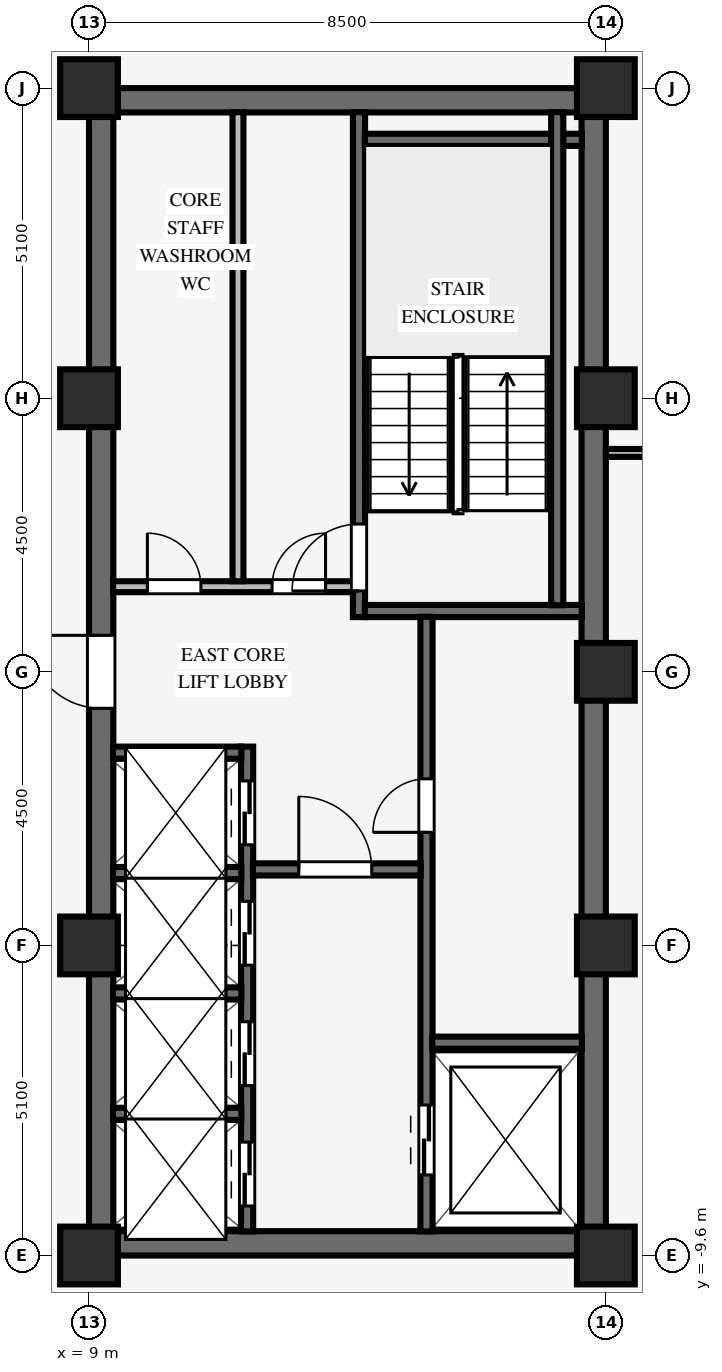
"""IFC4 building model, lengths in metres.
Left out: names, types, materials, properties, quantities, classifications, styles, units other than length and angle.
Written with IfcOpenShell. Run it as: python <this file> out.ifc"""

import sys

from ifc_helpers import new_model, si_unit, direction, frame, frame_2d, origin, origin_2d, place, context, subcontext, project, spatial, rectangle, extrude, source, transform, mapped, element, fill, save


model = new_model("IFC4")
c1 = context("Model", 3, precision=1e-05, world=origin(), true_north=direction((0.0, 1.0)))
c2 = subcontext(c1, "Body", "Model", "MODEL_VIEW")
j1 = project(units=[si_unit("LENGTHUNIT", "METRE"), si_unit("PLANEANGLEUNIT", "RADIAN")], contexts=[c1])
p1 = place(None, origin())
s1 = spatial("IfcSite", under=j1, at=p1, CompositionType="ELEMENT")
p2 = place(p1, origin())
s2 = spatial("IfcBuilding", under=s1, at=p2, CompositionType="ELEMENT")
p3 = place(p2, frame((0.0, 0.0, 138.45)))
s3 = spatial("IfcBuildingStorey", under=s2, at=p3, CompositionType="ELEMENT", Elevation=138.45)
for number, where, z_axis, x_axis in (
    (1, (9.0, -9.4, 0.0), (0.0, 0.0, 1.0), (1.0, 0.0, 0.0)),
    (2, (9.0, 9.4, 0.0), (0.0, 0.0, 1.0), (1.0, 0.0, 0.0)),
):
    element("IfcWall", number, at=place(p3, frame(where, z_axis=z_axis, x_axis=x_axis)), inside=s3, PredefinedType="SHEAR", context=c2, shape_type="SweptSolid", body=[
        extrude(rectangle(XDim=8.5, YDim=0.4, at=frame_2d((4.25, 0.0))), origin(), (0.0, 0.0, 1.0), 3.37),
    ])
p4 = place(p3, frame((9.2, -9.205, 0.0), z_axis=(0.0, 0.0, 1.0), x_axis=(0.0, 1.0, 0.0)))
e3 = element("IfcWall", 3, at=p4, inside=s3, PredefinedType="SHEAR", context=c2, shape_type="SweptSolid", body=[
    extrude(rectangle(XDim=18.41, YDim=0.4, at=frame_2d((9.205, 0.0))), origin(), (0.0, 0.0, 1.0), 3.37),
])
p5 = place(p4, frame((8.605, 0.0, 0.0)))
e4 = element("IfcOpeningElement", 4, at=p5, cuts=e3, PredefinedType="OPENING", context=c2, shape_type="SweptSolid", body=[
    extrude(rectangle(XDim=1.2, YDim=2.15, at=frame_2d((0.6, 1.075))), frame((0.0, 0.21, 0.0), z_axis=(0.0, -1.0, 0.0), x_axis=(1.0, 0.0, 0.0)), (0.0, 0.0, 1.0), 0.42),
])
p6 = place(p3, frame((17.3, -9.205, 0.0), z_axis=(0.0, 0.0, 1.0), x_axis=(0.0, 1.0, 0.0)))
e5 = element("IfcWall", 5, at=p6, inside=s3, PredefinedType="SHEAR", context=c2, shape_type="SweptSolid", body=[
    extrude(rectangle(XDim=18.41, YDim=0.4, at=frame_2d((9.205, 0.0))), origin(), (0.0, 0.0, 1.0), 3.37),
])
for number, where, z_axis, x_axis in (
    (6, (9.0, -9.6, 0.0), (0.0, 0.0, 1.0), (1.0, 0.0, 0.0)),
    (7, (9.0, -4.5, 0.0), (0.0, 0.0, 1.0), (1.0, 0.0, 0.0)),
    (8, (9.0, 4.5, 0.0), (0.0, 0.0, 1.0), (1.0, 0.0, 0.0)),
    (9, (9.0, 9.6, 0.0), (0.0, 0.0, 1.0), (1.0, 0.0, 0.0)),
    (10, (17.5, -9.6, 0.0), (0.0, 0.0, 1.0), (1.0, 0.0, 0.0)),
    (11, (17.5, -4.5, 0.0), (0.0, 0.0, 1.0), (1.0, 0.0, 0.0)),
    (12, (17.5, 4.5, 0.0), (0.0, 0.0, 1.0), (1.0, 0.0, 0.0)),
    (13, (17.5, 9.6, 0.0), (0.0, 0.0, 1.0), (1.0, 0.0, 0.0)),
    (14, (17.5, 0.0, 0.0), (0.0, 0.0, 1.0), (1.0, 0.0, 0.0)),
):
    element("IfcColumn", number, at=place(p3, frame(where, z_axis=z_axis, x_axis=x_axis)), inside=s3, PredefinedType="COLUMN", context=c2, shape_type="SweptSolid", body=[
        extrude(rectangle(XDim=0.95, YDim=0.95, at=origin_2d()), origin(), (0.0, 0.0, 1.0), 3.37),
    ])
p7 = place(p3, frame((13.44, 0.9, 0.0), z_axis=(0.0, 0.0, 1.0), x_axis=(0.0, 1.0, 0.0)))
e15 = element("IfcWall", 15, at=p7, inside=s3, PredefinedType="SHEAR", context=c2, shape_type="SweptSolid", body=[
    extrude(rectangle(XDim=8.305, YDim=0.2, at=frame_2d((4.153, 0.0))), origin(), (0.0, 0.0, 1.0), 3.37),
])
p8 = place(p7, frame((0.43, 0.0, 0.0)))
e16 = element("IfcOpeningElement", 16, at=p8, cuts=e15, PredefinedType="OPENING", context=c2, shape_type="SweptSolid", body=[
    extrude(rectangle(XDim=1.1, YDim=2.15, at=frame_2d((0.55, 1.075))), frame((0.0, 0.11, 0.0), z_axis=(0.0, -1.0, 0.0), x_axis=(1.0, 0.0, 0.0)), (0.0, 0.0, 1.0), 0.22),
])
for number, where, z_axis, x_axis in (
    (17, (13.535, 1.0, 0.0), (0.0, 0.0, 1.0), (1.0, 0.0, 0.0)),
    (18, (13.535, 8.75, 0.0), (0.0, 0.0, 1.0), (1.0, 0.0, 0.0)),
):
    element("IfcWall", number, at=place(p3, frame(where, z_axis=z_axis, x_axis=x_axis)), inside=s3, PredefinedType="SHEAR", context=c2, shape_type="SweptSolid", body=[
        extrude(rectangle(XDim=3.57, YDim=0.2, at=frame_2d((1.785, 0.0))), origin(), (0.0, 0.0, 1.0), 3.37),
    ])
p9 = place(p3, frame((16.7, 1.095, 0.0), z_axis=(0.0, 0.0, 1.0), x_axis=(0.0, 1.0, 0.0)))
e19 = element("IfcWall", 19, at=p9, inside=s3, PredefinedType="SHEAR", context=c2, shape_type="SweptSolid", body=[
    extrude(rectangle(XDim=8.11, YDim=0.2, at=frame_2d((4.055, 0.0))), origin(), (0.0, 0.0, 1.0), 3.37),
])
p10 = place(p3, frame((14.55, -9.205, 0.0), z_axis=(0.0, 0.0, 1.0), x_axis=(0.0, 1.0, 0.0)))
e20 = element("IfcWall", 20, at=p10, inside=s3, PredefinedType="SHEAR", context=c2, shape_type="SweptSolid", body=[
    extrude(rectangle(XDim=10.11, YDim=0.2, at=frame_2d((5.055, 0.0))), origin(), (0.0, 0.0, 1.0), 3.37),
])
p11 = place(p10, frame((6.565, 0.0, 0.0)))
e21 = element("IfcOpeningElement", 21, at=p11, cuts=e20, PredefinedType="OPENING", context=c2, shape_type="SweptSolid", body=[
    extrude(rectangle(XDim=0.88, YDim=2.1, at=frame_2d((0.44, 1.05))), frame((0.0, 0.11, 0.0), z_axis=(0.0, -1.0, 0.0), x_axis=(1.0, 0.0, 0.0)), (0.0, 0.0, 1.0), 0.22),
])
p12 = place(p10, frame((0.93, 0.0, 0.0)))
e22 = element("IfcOpeningElement", 22, at=p12, cuts=e20, PredefinedType="OPENING", context=c2, shape_type="SweptSolid", body=[
    extrude(rectangle(XDim=1.15, YDim=2.15, at=frame_2d((0.575, 1.075))), frame((0.0, 0.11, 0.0), z_axis=(0.0, -1.0, 0.0), x_axis=(1.0, 0.0, 0.0)), (0.0, 0.0, 1.0), 0.22),
])
p13 = place(p3, frame((14.645, -6.1, 0.0), z_axis=(0.0, 0.0, 1.0), x_axis=(1.0, 0.0, 0.0)))
e23 = element("IfcWall", 23, at=p13, inside=s3, PredefinedType="SHEAR", context=c2, shape_type="SweptSolid", body=[
    extrude(rectangle(XDim=2.46, YDim=0.2, at=frame_2d((1.23, 0.0))), origin(), (0.0, 0.0, 1.0), 3.37),
])
p14 = place(p3, frame((11.6, -9.205, 0.0), z_axis=(0.0, 0.0, 1.0), x_axis=(0.0, 1.0, 0.0)))
e24 = element("IfcWall", 24, at=p14, inside=s3, PredefinedType="SHEAR", context=c2, shape_type="SweptSolid", body=[
    extrude(rectangle(XDim=7.975, YDim=0.2, at=frame_2d((3.988, 0.0))), origin(), (0.0, 0.0, 1.0), 3.37),
])
p15 = place(p14, frame((0.42, 0.0, 0.0)))
e25 = element("IfcOpeningElement", 25, at=p15, cuts=e24, PredefinedType="OPENING", context=c2, shape_type="SweptSolid", body=[
    extrude(rectangle(XDim=1.05, YDim=2.15, at=frame_2d((0.525, 1.075))), frame((0.0, 0.11, 0.0), z_axis=(0.0, -1.0, 0.0), x_axis=(1.0, 0.0, 0.0)), (0.0, 0.0, 1.0), 0.22),
])
p16 = place(p14, frame((2.4, 0.0, 0.0)))
e26 = element("IfcOpeningElement", 26, at=p16, cuts=e24, PredefinedType="OPENING", context=c2, shape_type="SweptSolid", body=[
    extrude(rectangle(XDim=1.05, YDim=2.15, at=frame_2d((0.525, 1.075))), frame((0.0, 0.11, 0.0), z_axis=(0.0, -1.0, 0.0), x_axis=(1.0, 0.0, 0.0)), (0.0, 0.0, 1.0), 0.22),
])
p17 = place(p14, frame((4.38, 0.0, 0.0)))
e27 = element("IfcOpeningElement", 27, at=p17, cuts=e24, PredefinedType="OPENING", context=c2, shape_type="SweptSolid", body=[
    extrude(rectangle(XDim=1.05, YDim=2.15, at=frame_2d((0.525, 1.075))), frame((0.0, 0.11, 0.0), z_axis=(0.0, -1.0, 0.0), x_axis=(1.0, 0.0, 0.0)), (0.0, 0.0, 1.0), 0.22),
])
p18 = place(p14, frame((6.36, 0.0, 0.0)))
e28 = element("IfcOpeningElement", 28, at=p18, cuts=e24, PredefinedType="OPENING", context=c2, shape_type="SweptSolid", body=[
    extrude(rectangle(XDim=1.05, YDim=2.15, at=frame_2d((0.525, 1.075))), frame((0.0, 0.11, 0.0), z_axis=(0.0, -1.0, 0.0), x_axis=(1.0, 0.0, 0.0)), (0.0, 0.0, 1.0), 0.22),
])
p19 = place(p3, frame((11.695, -3.25, 0.0), z_axis=(0.0, 0.0, 1.0), x_axis=(1.0, 0.0, 0.0)))
e29 = element("IfcWall", 29, at=p19, inside=s3, PredefinedType="SHEAR", context=c2, shape_type="SweptSolid", body=[
    extrude(rectangle(XDim=2.76, YDim=0.2, at=frame_2d((1.38, 0.0))), origin(), (0.0, 0.0, 1.0), 3.37),
])
p20 = place(p19, frame((0.755, 0.0, 0.0)))
e30 = element("IfcOpeningElement", 30, at=p20, cuts=e29, PredefinedType="OPENING", context=c2, shape_type="SweptSolid", body=[
    extrude(rectangle(XDim=1.2, YDim=2.15, at=frame_2d((0.6, 1.075))), frame((0.0, 0.11, 0.0), z_axis=(0.0, -1.0, 0.0), x_axis=(1.0, 0.0, 0.0)), (0.0, 0.0, 1.0), 0.22),
])
for number, where, z_axis, x_axis in (
    (31, (9.395, -7.27, 0.0), (0.0, 0.0, 1.0), (1.0, 0.0, 0.0)),
    (32, (9.395, -5.29, 0.0), (0.0, 0.0, 1.0), (1.0, 0.0, 0.0)),
    (33, (9.395, -3.31, 0.0), (0.0, 0.0, 1.0), (1.0, 0.0, 0.0)),
    (34, (9.395, -1.33, 0.0), (0.0, 0.0, 1.0), (1.0, 0.0, 0.0)),
):
    element("IfcWall", number, at=place(p3, frame(where, z_axis=z_axis, x_axis=x_axis)), inside=s3, PredefinedType="SHEAR", context=c2, shape_type="SweptSolid", body=[
        extrude(rectangle(XDim=2.11, YDim=0.2, at=frame_2d((1.055, 0.0))), origin(), (0.0, 0.0, 1.0), 3.37),
    ])
p21 = place(p3, frame((9.395, 1.4, 0.0), z_axis=(0.0, 0.0, 1.0), x_axis=(1.0, 0.0, 0.0)))
e35 = element("IfcWall", 35, at=p21, inside=s3, PredefinedType="PARTITIONING", context=c2, shape_type="SweptSolid", body=[
    extrude(rectangle(XDim=3.95, YDim=0.18, at=frame_2d((1.975, 0.0))), origin(), (0.0, 0.0, 1.0), 3.36),
])
p22 = place(p21, frame((0.565, 0.0, 0.0)))
e36 = element("IfcOpeningElement", 36, at=p22, cuts=e35, PredefinedType="OPENING", context=c2, shape_type="SweptSolid", body=[
    extrude(rectangle(XDim=0.88, YDim=2.1, at=frame_2d((0.44, 1.05))), frame((0.0, 0.1, 0.0), z_axis=(0.0, -1.0, 0.0), x_axis=(1.0, 0.0, 0.0)), (0.0, 0.0, 1.0), 0.2),
])
p23 = place(p21, frame((2.615, 0.0, 0.0)))
e37 = element("IfcOpeningElement", 37, at=p23, cuts=e35, PredefinedType="OPENING", context=c2, shape_type="SweptSolid", body=[
    extrude(rectangle(XDim=0.88, YDim=2.1, at=frame_2d((0.44, 1.05))), frame((0.0, 0.1, 0.0), z_axis=(0.0, -1.0, 0.0), x_axis=(1.0, 0.0, 0.0)), (0.0, 0.0, 1.0), 0.2),
])
p24 = place(p3, frame((11.45, 1.49, 0.0), z_axis=(0.0, 0.0, 1.0), x_axis=(0.0, 1.0, 0.0)))
e38 = element("IfcWall", 38, at=p24, inside=s3, PredefinedType="PARTITIONING", context=c2, shape_type="SweptSolid", body=[
    extrude(rectangle(XDim=7.715, YDim=0.18, at=frame_2d((3.857, 0.0))), origin(), (0.0, 0.0, 1.0), 3.36),
])
p25 = place(p3, frame((17.5, 3.6, 0.0), z_axis=(0.0, 0.0, 1.0), x_axis=(1.0, 0.0, 0.0)))
e39 = element("IfcWall", 39, at=p25, inside=s3, PredefinedType="PARTITIONING", context=c2, shape_type="SweptSolid", body=[
    extrude(rectangle(XDim=8.58, YDim=0.13, at=frame_2d((4.29, 0.0))), origin(), (0.0, 0.0, 1.0), 3.36),
])
m1 = source(origin(), c2, "Body", "SweptSolid", [
    extrude(rectangle(XDim=1.1, YDim=2.15, at=frame_2d((0.55, 1.075))), frame((0.0, 0.025, 0.0), z_axis=(0.0, -1.0, 0.0), x_axis=(1.0, 0.0, 0.0)), (0.0, 0.0, 1.0), 0.05),
])
p26 = place(p8, origin())
e40 = element("IfcDoor", 40, at=p26, inside=s3, OperationType="SINGLE_SWING_LEFT", PredefinedType="DOOR", context=c2, shape_type="MappedRepresentation", body=[
    mapped(m1, transform((0.0, 0.0, 0.0), scale=1.0)),
])
fill(e16, e40)
m2 = source(origin(), c2, "Body", "SweptSolid", [
    extrude(rectangle(XDim=0.88, YDim=2.1, at=frame_2d((0.44, 1.05))), frame((0.0, 0.025, 0.0), z_axis=(0.0, -1.0, 0.0), x_axis=(1.0, 0.0, 0.0)), (0.0, 0.0, 1.0), 0.05),
])
p27 = place(p11, origin())
e41 = element("IfcDoor", 41, at=p27, inside=s3, OperationType="SINGLE_SWING_LEFT", PredefinedType="DOOR", context=c2, shape_type="MappedRepresentation", body=[
    mapped(m2, transform((0.0, 0.0, 0.0), scale=1.0)),
])
fill(e21, e41)
m3 = source(origin(), c2, "Body", "SweptSolid", [
    extrude(rectangle(XDim=1.2, YDim=2.15, at=frame_2d((0.6, 1.075))), frame((0.0, 0.025, 0.0), z_axis=(0.0, -1.0, 0.0), x_axis=(1.0, 0.0, 0.0)), (0.0, 0.0, 1.0), 0.05),
])
p28 = place(p20, origin())
e42 = element("IfcDoor", 42, at=p28, inside=s3, OperationType="SINGLE_SWING_LEFT", PredefinedType="DOOR", context=c2, shape_type="MappedRepresentation", body=[
    mapped(m3, transform((0.0, 0.0, 0.0), scale=1.0)),
])
fill(e30, e42)
p29 = place(p5, origin())
e43 = element("IfcDoor", 43, at=p29, inside=s3, OperationType="SINGLE_SWING_RIGHT", PredefinedType="DOOR", context=c2, shape_type="MappedRepresentation", body=[
    mapped(m3, transform((0.0, 0.0, 0.0), scale=1.0)),
])
fill(e4, e43)
p30 = place(p22, origin())
e44 = element("IfcDoor", 44, at=p30, inside=s3, OperationType="SINGLE_SWING_LEFT", PredefinedType="DOOR", context=c2, shape_type="MappedRepresentation", body=[
    mapped(m2, transform((0.0, 0.0, 0.0), scale=1.0)),
])
fill(e36, e44)
p31 = place(p23, origin())
e45 = element("IfcDoor", 45, at=p31, inside=s3, OperationType="SINGLE_SWING_RIGHT", PredefinedType="DOOR", context=c2, shape_type="MappedRepresentation", body=[
    mapped(m2, transform((0.0, 0.0, 0.0), scale=1.0)),
])
fill(e37, e45)
m4 = source(origin(), c2, "Body", "SweptSolid", [
    extrude(rectangle(XDim=1.15, YDim=2.15, at=frame_2d((0.575, 1.075))), frame((0.0, 0.025, 0.0), z_axis=(0.0, -1.0, 0.0), x_axis=(1.0, 0.0, 0.0)), (0.0, 0.0, 1.0), 0.05),
])
p32 = place(p12, origin())
e46 = element("IfcDoor", 46, at=p32, inside=s3, OperationType="DOUBLE_DOOR_SLIDING", PredefinedType="DOOR", context=c2, shape_type="MappedRepresentation", body=[
    mapped(m4, transform((0.0, 0.0, 0.0), scale=1.0)),
])
fill(e22, e46)
m5 = source(origin(), c2, "Body", "SweptSolid", [
    extrude(rectangle(XDim=1.05, YDim=2.15, at=frame_2d((0.525, 1.075))), frame((0.0, 0.025, 0.0), z_axis=(0.0, -1.0, 0.0), x_axis=(1.0, 0.0, 0.0)), (0.0, 0.0, 1.0), 0.05),
])
p33 = place(p15, origin())
e47 = element("IfcDoor", 47, at=p33, inside=s3, OperationType="DOUBLE_DOOR_SLIDING", PredefinedType="DOOR", context=c2, shape_type="MappedRepresentation", body=[
    mapped(m5, transform((0.0, 0.0, 0.0), scale=1.0)),
])
fill(e25, e47)
p34 = place(p16, origin())
e48 = element("IfcDoor", 48, at=p34, inside=s3, OperationType="DOUBLE_DOOR_SLIDING", PredefinedType="DOOR", context=c2, shape_type="MappedRepresentation", body=[
    mapped(m5, transform((0.0, 0.0, 0.0), scale=1.0)),
])
fill(e26, e48)
p35 = place(p17, origin())
e49 = element("IfcDoor", 49, at=p35, inside=s3, OperationType="DOUBLE_DOOR_SLIDING", PredefinedType="DOOR", context=c2, shape_type="MappedRepresentation", body=[
    mapped(m5, transform((0.0, 0.0, 0.0), scale=1.0)),
])
fill(e27, e49)
p36 = place(p18, origin())
e50 = element("IfcDoor", 50, at=p36, inside=s3, OperationType="DOUBLE_DOOR_SLIDING", PredefinedType="DOOR", context=c2, shape_type="MappedRepresentation", body=[
    mapped(m5, transform((0.0, 0.0, 0.0), scale=1.0)),
])
fill(e28, e50)
save(model, sys.argv[1])
